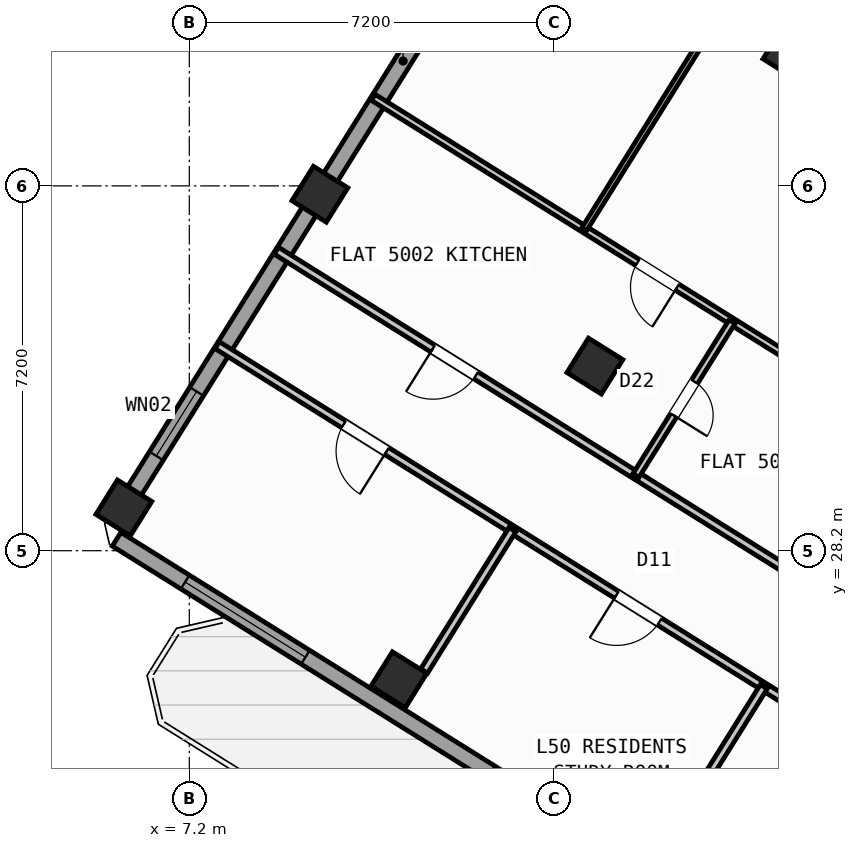
"""IFC4 building model, lengths in metres.
Left out: names, types, materials, properties, quantities, classifications, styles, units other than length and angle.
Written with IfcOpenShell. Run it as: python <this file> out.ifc"""

import sys

from ifc_helpers import new_model, si_unit, direction, frame, frame_2d, origin, origin_2d, place, context, subcontext, project, spatial, rectangle, hollow_rectangle, extrude, source, transform, mapped, element, fill, save


model = new_model("IFC4")
c1 = context("Model", 3, precision=1e-05, world=origin(), true_north=direction((0.0, 1.0)))
c2 = subcontext(c1, "Body", "Model", "MODEL_VIEW")
j1 = project(units=[si_unit("LENGTHUNIT", "METRE"), si_unit("PLANEANGLEUNIT", "RADIAN")], contexts=[c1])
p1 = place(None, origin())
s1 = spatial("IfcSite", under=j1, at=p1, CompositionType="ELEMENT")
p2 = place(p1, origin())
s2 = spatial("IfcBuilding", under=s1, at=p2, CompositionType="ELEMENT")
p3 = place(p2, frame((0.0, 0.0, 199.5)))
s3 = spatial("IfcBuildingStorey", under=s2, at=p3, CompositionType="ELEMENT", Elevation=199.5)
m1 = source(origin(), c2, "Body", "SweptSolid", [
    extrude(hollow_rectangle(XDim=0.8, YDim=0.8, WallThickness=0.032, at=origin_2d()), origin(), (0.0, 0.0, 1.0), 4.5),
])
for number, where, z_axis, x_axis in (
    (1, (19.073, 38.034, 0.0), (0.0, 0.0, 1.0), (-0.848, 0.53, 0.0)),
    (2, (15.205, 31.844, 0.0), (0.0, 0.0, 1.0), (-0.848, 0.53, 0.0)),
    (3, (11.336, 25.653, 0.0), (0.0, 0.0, 1.0), (-0.848, 0.53, 0.0)),
    (4, (9.777, 35.235, 0.0), (0.0, 0.0, 1.0), (-0.848, 0.53, 0.0)),
    (5, (5.909, 29.044, 0.0), (0.0, 0.0, 1.0), (-0.848, 0.53, 0.0)),
):
    element("IfcColumn", number, at=place(p3, frame(where, z_axis=z_axis, x_axis=x_axis)), inside=s3, PredefinedType="COLUMN", context=c2, shape_type="MappedRepresentation", body=[
        mapped(m1, transform((0.0, 0.0, 0.0), scale=1.0)),
    ])
p4 = place(p3, frame((31.76, 12.183, 0.0), z_axis=(0.0, 0.0, 1.0), x_axis=(-0.848047074256, 0.529920899612, 0.0)))
e6 = element("IfcWall", 6, at=p4, inside=s3, PredefinedType="STANDARD", context=c2, shape_type="SweptSolid", body=[
    extrude(rectangle(XDim=30.652, YDim=0.32, at=frame_2d((15.326, 0.0))), origin(), (0.0, 0.0, 1.0), 4.25),
])
p5 = place(p4, frame((15.166, 0.0, 0.0)))
e7 = element("IfcOpeningElement", 7, at=p5, cuts=e6, PredefinedType="OPENING", context=c2, shape_type="SweptSolid", body=[
    extrude(rectangle(XDim=1.2, YDim=2.15, at=frame_2d((0.6, 1.075))), frame((0.0, 0.17, 0.0), z_axis=(0.0, -1.0, 0.0), x_axis=(1.0, 0.0, 0.0)), (0.0, 0.0, 1.0), 0.34),
])
p6 = place(p4, frame((1.665, 0.0, 0.65)))
e8 = element("IfcOpeningElement", 8, at=p6, cuts=e6, PredefinedType="OPENING", context=c2, shape_type="SweptSolid", body=[
    extrude(rectangle(XDim=2.8, YDim=2.1, at=frame_2d((1.4, 1.05))), frame((0.0, 0.17, 0.0), z_axis=(0.0, -1.0, 0.0), x_axis=(1.0, 0.0, 0.0)), (0.0, 0.0, 1.0), 0.34),
])
p7 = place(p4, frame((6.894, 0.0, 0.65)))
e9 = element("IfcOpeningElement", 9, at=p7, cuts=e6, PredefinedType="OPENING", context=c2, shape_type="SweptSolid", body=[
    extrude(rectangle(XDim=2.8, YDim=2.1, at=frame_2d((1.4, 1.05))), frame((0.0, 0.17, 0.0), z_axis=(0.0, -1.0, 0.0), x_axis=(1.0, 0.0, 0.0)), (0.0, 0.0, 1.0), 0.34),
])
p8 = place(p4, frame((20.453, 0.0, 0.85)))
e10 = element("IfcOpeningElement", 10, at=p8, cuts=e6, PredefinedType="OPENING", context=c2, shape_type="SweptSolid", body=[
    extrude(rectangle(XDim=1.5, YDim=1.5, at=frame_2d((0.75, 0.75))), frame((0.0, 0.17, 0.0), z_axis=(0.0, -1.0, 0.0), x_axis=(1.0, 0.0, 0.0)), (0.0, 0.0, 1.0), 0.34),
])
p9 = place(p4, frame((26.258, 0.0, 0.65)))
e11 = element("IfcOpeningElement", 11, at=p9, cuts=e6, PredefinedType="OPENING", context=c2, shape_type="SweptSolid", body=[
    extrude(rectangle(XDim=2.8, YDim=2.1, at=frame_2d((1.4, 1.05))), frame((0.0, 0.17, 0.0), z_axis=(0.0, -1.0, 0.0), x_axis=(1.0, 0.0, 0.0)), (0.0, 0.0, 1.0), 0.34),
])
p10 = place(p3, frame((5.7, 28.71, 0.0), z_axis=(0.0, 0.0, 1.0), x_axis=(0.529923711467, 0.8480453172, 0.0)))
e12 = element("IfcWall", 12, at=p10, inside=s3, PredefinedType="STANDARD", context=c2, shape_type="SweptSolid", body=[
    extrude(rectangle(XDim=21.587, YDim=0.32, at=frame_2d((10.794, 0.0))), origin(), (0.0, 0.0, 1.0), 3.725),
])
p11 = place(p10, frame((1.604, 0.0, 0.85)))
e13 = element("IfcOpeningElement", 13, at=p11, cuts=e12, PredefinedType="OPENING", context=c2, shape_type="SweptSolid", body=[
    extrude(rectangle(XDim=1.5, YDim=1.5, at=frame_2d((0.75, 0.75))), frame((0.0, 0.17, 0.0), z_axis=(0.0, -1.0, 0.0), x_axis=(1.0, 0.0, 0.0)), (0.0, 0.0, 1.0), 0.34),
])
p12 = place(p10, frame((11.269, 0.0, 0.8)))
e14 = element("IfcOpeningElement", 14, at=p12, cuts=e12, PredefinedType="OPENING", context=c2, shape_type="SweptSolid", body=[
    extrude(rectangle(XDim=2.1, YDim=1.55, at=frame_2d((1.05, 0.775))), frame((0.0, 0.17, 0.0), z_axis=(0.0, -1.0, 0.0), x_axis=(1.0, 0.0, 0.0)), (0.0, 0.0, 1.0), 0.34),
])
p13 = place(p10, frame((17.406, 0.0, 0.85)))
e15 = element("IfcOpeningElement", 15, at=p13, cuts=e12, PredefinedType="OPENING", context=c2, shape_type="SweptSolid", body=[
    extrude(rectangle(XDim=1.5, YDim=1.5, at=frame_2d((0.75, 0.75))), frame((0.0, 0.17, 0.0), z_axis=(0.0, -1.0, 0.0), x_axis=(1.0, 0.0, 0.0)), (0.0, 0.0, 1.0), 0.34),
])
p14 = place(p3, frame((17.424, 47.083, 0.0), z_axis=(0.0, 0.0, 1.0), x_axis=(0.848049927979, -0.529916332693, 0.0)))
e16 = element("IfcWall", 16, at=p14, inside=s3, PredefinedType="STANDARD", context=c2, shape_type="SweptSolid", body=[
    extrude(rectangle(XDim=29.223, YDim=0.32, at=frame_2d((14.612, 0.0))), origin(), (0.0, 0.0, 1.0), 4.25),
])
p15 = place(p14, frame((2.949, 0.0, 0.0)))
e17 = element("IfcOpeningElement", 17, at=p15, cuts=e16, PredefinedType="OPENING", context=c2, shape_type="SweptSolid", body=[
    extrude(rectangle(XDim=1.05, YDim=2.15, at=frame_2d((0.525, 1.075))), frame((0.0, 0.17, 0.0), z_axis=(0.0, -1.0, 0.0), x_axis=(1.0, 0.0, 0.0)), (0.0, 0.0, 1.0), 0.34),
])
p16 = place(p14, frame((0.789, 0.0, 0.85)))
e18 = element("IfcOpeningElement", 18, at=p16, cuts=e16, PredefinedType="OPENING", context=c2, shape_type="SweptSolid", body=[
    extrude(rectangle(XDim=1.5, YDim=1.5, at=frame_2d((0.75, 0.75))), frame((0.0, 0.17, 0.0), z_axis=(0.0, -1.0, 0.0), x_axis=(1.0, 0.0, 0.0)), (0.0, 0.0, 1.0), 0.34),
])
p17 = place(p14, frame((8.329, 0.0, 0.8)))
e19 = element("IfcOpeningElement", 19, at=p17, cuts=e16, PredefinedType="OPENING", context=c2, shape_type="SweptSolid", body=[
    extrude(rectangle(XDim=2.1, YDim=1.55, at=frame_2d((1.05, 0.775))), frame((0.0, 0.17, 0.0), z_axis=(0.0, -1.0, 0.0), x_axis=(1.0, 0.0, 0.0)), (0.0, 0.0, 1.0), 0.34),
])
p18 = place(p14, frame((13.739, 0.0, 0.85)))
e20 = element("IfcOpeningElement", 20, at=p18, cuts=e16, PredefinedType="OPENING", context=c2, shape_type="SweptSolid", body=[
    extrude(rectangle(XDim=1.5, YDim=1.5, at=frame_2d((0.75, 0.75))), frame((0.0, 0.17, 0.0), z_axis=(0.0, -1.0, 0.0), x_axis=(1.0, 0.0, 0.0)), (0.0, 0.0, 1.0), 0.34),
])
p19 = place(p14, frame((21.114, 0.0, 0.65)))
e21 = element("IfcOpeningElement", 21, at=p19, cuts=e16, PredefinedType="OPENING", context=c2, shape_type="SweptSolid", body=[
    extrude(rectangle(XDim=2.8, YDim=2.1, at=frame_2d((1.4, 1.05))), frame((0.0, 0.17, 0.0), z_axis=(0.0, -1.0, 0.0), x_axis=(1.0, 0.0, 0.0)), (0.0, 0.0, 1.0), 0.34),
])
p20 = place(p14, frame((26.784, 0.0, 0.85)))
e22 = element("IfcOpeningElement", 22, at=p20, cuts=e16, PredefinedType="OPENING", context=c2, shape_type="SweptSolid", body=[
    extrude(rectangle(XDim=1.5, YDim=1.5, at=frame_2d((0.75, 0.75))), frame((0.0, 0.17, 0.0), z_axis=(0.0, -1.0, 0.0), x_axis=(1.0, 0.0, 0.0)), (0.0, 0.0, 1.0), 0.34),
])
p21 = place(p3, frame((23.104, 25.256, 0.0), z_axis=(0.0, 0.0, 1.0), x_axis=(-0.848041752158, 0.529929416617, 0.0)))
e23 = element("IfcWall", 23, at=p21, inside=s3, PredefinedType="PARTITIONING", context=c2, shape_type="SweptSolid", body=[
    extrude(rectangle(XDim=16.73, YDim=0.16, at=frame_2d((8.365, 0.0))), origin(), (0.0, 0.0, 1.0), 4.24),
])
p22 = place(p21, frame((2.22, 0.0, 0.0)))
e24 = element("IfcOpeningElement", 24, at=p22, cuts=e23, PredefinedType="OPENING", context=c2, shape_type="SweptSolid", body=[
    extrude(rectangle(XDim=0.86, YDim=2.05, at=frame_2d((0.43, 1.025))), frame((0.0, 0.09, 0.0), z_axis=(0.0, -1.0, 0.0), x_axis=(1.0, 0.0, 0.0)), (0.0, 0.0, 1.0), 0.18),
])
p23 = place(p21, frame((12.084, 0.0, 0.0)))
e25 = element("IfcOpeningElement", 25, at=p23, cuts=e23, PredefinedType="OPENING", context=c2, shape_type="SweptSolid", body=[
    extrude(rectangle(XDim=1.0, YDim=2.1, at=frame_2d((0.5, 1.05))), frame((0.0, 0.09, 0.0), z_axis=(0.0, -1.0, 0.0), x_axis=(1.0, 0.0, 0.0)), (0.0, 0.0, 1.0), 0.18),
])
p24 = place(p3, frame((21.938, 23.391, 0.0), z_axis=(0.0, 0.0, 1.0), x_axis=(-0.848045850158, 0.529922858565, 0.0)))
e26 = element("IfcWall", 26, at=p24, inside=s3, PredefinedType="PARTITIONING", context=c2, shape_type="SweptSolid", body=[
    extrude(rectangle(XDim=16.73, YDim=0.16, at=frame_2d((8.365, 0.0))), origin(), (0.0, 0.0, 1.0), 4.24),
])
p25 = place(p24, frame((1.505, 0.0, 0.0)))
e27 = element("IfcOpeningElement", 27, at=p25, cuts=e26, PredefinedType="OPENING", context=c2, shape_type="SweptSolid", body=[
    extrude(rectangle(XDim=1.0, YDim=2.1, at=frame_2d((0.5, 1.05))), frame((0.0, 0.09, 0.0), z_axis=(0.0, -1.0, 0.0), x_axis=(1.0, 0.0, 0.0)), (0.0, 0.0, 1.0), 0.18),
])
p26 = place(p24, frame((6.435, 0.0, 0.0)))
e28 = element("IfcOpeningElement", 28, at=p26, cuts=e26, PredefinedType="OPENING", context=c2, shape_type="SweptSolid", body=[
    extrude(rectangle(XDim=1.0, YDim=2.1, at=frame_2d((0.5, 1.05))), frame((0.0, 0.09, 0.0), z_axis=(0.0, -1.0, 0.0), x_axis=(1.0, 0.0, 0.0)), (0.0, 0.0, 1.0), 0.18),
])
p27 = place(p24, frame((12.784, 0.0, 0.0)))
e29 = element("IfcOpeningElement", 29, at=p27, cuts=e26, PredefinedType="OPENING", context=c2, shape_type="SweptSolid", body=[
    extrude(rectangle(XDim=1.0, YDim=2.1, at=frame_2d((0.5, 1.05))), frame((0.0, 0.09, 0.0), z_axis=(0.0, -1.0, 0.0), x_axis=(1.0, 0.0, 0.0)), (0.0, 0.0, 1.0), 0.18),
])
p28 = place(p3, frame((18.538, 25.516, 0.0), z_axis=(0.0, 0.0, 1.0), x_axis=(-0.529938869374, -0.84803584519, 0.0)))
e30 = element("IfcWall", 30, at=p28, inside=s3, PredefinedType="PARTITIONING", context=c2, shape_type="SweptSolid", body=[
    extrude(rectangle(XDim=3.288, YDim=0.16, at=frame_2d((1.644, 0.0))), origin(), (0.0, 0.0, 1.0), 3.725),
])
p29 = place(p3, frame((13.577, 28.615, 0.0), z_axis=(0.0, 0.0, 1.0), x_axis=(-0.529885466561, -0.848069214349, 0.0)))
e31 = element("IfcWall", 31, at=p29, inside=s3, PredefinedType="PARTITIONING", context=c2, shape_type="SweptSolid", body=[
    extrude(rectangle(XDim=3.288, YDim=0.16, at=frame_2d((1.644, 0.0))), origin(), (0.0, 0.0, 1.0), 4.24),
])
p30 = place(p3, frame((21.787, 30.301, 0.0), z_axis=(0.0, 0.0, 1.0), x_axis=(-0.848043949058, 0.52992590092, 0.0)))
e32 = element("IfcWall", 32, at=p30, inside=s3, PredefinedType="PLUMBINGWALL", context=c2, shape_type="SweptSolid", body=[
    extrude(rectangle(XDim=12.92, YDim=0.14, at=frame_2d((6.46, 0.0))), origin(), (0.0, 0.0, 1.0), 4.24),
])
p31 = place(p30, frame((5.849, 0.0, 0.0)))
e33 = element("IfcOpeningElement", 33, at=p31, cuts=e32, PredefinedType="OPENING", context=c2, shape_type="SweptSolid", body=[
    extrude(rectangle(XDim=0.92, YDim=2.08, at=frame_2d((0.46, 1.04))), frame((0.0, 0.08, 0.0), z_axis=(0.0, -1.0, 0.0), x_axis=(1.0, 0.0, 0.0)), (0.0, 0.0, 1.0), 0.16),
])
p32 = place(p3, frame((17.913, 32.721, 0.0), z_axis=(0.0, 0.0, 1.0), x_axis=(-0.529906983049, -0.848055770169, 0.0)))
e34 = element("IfcWall", 34, at=p32, inside=s3, PredefinedType="PLUMBINGWALL", context=c2, shape_type="SweptSolid", body=[
    extrude(rectangle(XDim=3.58, YDim=0.14, at=frame_2d((1.79, 0.0))), origin(), (0.0, 0.0, 1.0), 4.24),
])
p33 = place(p32, frame((1.4, 0.0, 0.0)))
e35 = element("IfcOpeningElement", 35, at=p33, cuts=e34, PredefinedType="OPENING", context=c2, shape_type="SweptSolid", body=[
    extrude(rectangle(XDim=0.78, YDim=2.05, at=frame_2d((0.39, 1.025))), frame((0.0, 0.08, 0.0), z_axis=(0.0, -1.0, 0.0), x_axis=(1.0, 0.0, 0.0)), (0.0, 0.0, 1.0), 0.16),
])
p34 = place(p3, frame((21.375, 44.756, 0.0), z_axis=(0.0, 0.0, 1.0), x_axis=(-0.529905980331, -0.848056396715, 0.0)))
e36 = element("IfcWall", 36, at=p34, inside=s3, PredefinedType="PARTITIONING", context=c2, shape_type="SweptSolid", body=[
    extrude(rectangle(XDim=12.04, YDim=0.11, at=frame_2d((6.02, 0.0))), origin(), (0.0, 0.0, 1.0), 4.24),
])
p35 = place(p34, frame((0.47, 0.0, 0.0)))
e37 = element("IfcOpeningElement", 37, at=p35, cuts=e36, PredefinedType="OPENING", context=c2, shape_type="SweptSolid", body=[
    extrude(rectangle(XDim=0.92, YDim=2.08, at=frame_2d((0.46, 1.04))), frame((0.0, 0.065, 0.0), z_axis=(0.0, -1.0, 0.0), x_axis=(1.0, 0.0, 0.0)), (0.0, 0.0, 1.0), 0.13),
])
m2 = source(origin(), c2, "Body", "SweptSolid", [
    extrude(rectangle(XDim=2.8, YDim=2.1, at=frame_2d((1.4, 1.05))), frame((0.0, 0.03, 0.0), z_axis=(0.0, -1.0, 0.0), x_axis=(1.0, 0.0, 0.0)), (0.0, 0.0, 1.0), 0.06),
])
p36 = place(p9, origin())
e38 = element("IfcWindow", 38, at=p36, inside=s3, PartitioningType="SINGLE_PANEL", PredefinedType="WINDOW", context=c2, shape_type="MappedRepresentation", body=[
    mapped(m2, transform((0.0, 0.0, 0.0), scale=1.0)),
])
fill(e11, e38)
m3 = source(origin(), c2, "Body", "SweptSolid", [
    extrude(rectangle(XDim=1.5, YDim=1.5, at=frame_2d((0.75, 0.75))), frame((0.0, 0.03, 0.0), z_axis=(0.0, -1.0, 0.0), x_axis=(1.0, 0.0, 0.0)), (0.0, 0.0, 1.0), 0.06),
])
p37 = place(p11, origin())
e39 = element("IfcWindow", 39, at=p37, inside=s3, PartitioningType="SINGLE_PANEL", PredefinedType="WINDOW", context=c2, shape_type="MappedRepresentation", body=[
    mapped(m3, transform((0.0, 0.0, 0.0), scale=1.0)),
])
fill(e13, e39)
m4 = source(origin(), c2, "Body", "SweptSolid", [
    extrude(rectangle(XDim=1.0, YDim=2.1, at=frame_2d((0.5, 1.05))), frame((0.0, 0.025, 0.0), z_axis=(0.0, -1.0, 0.0), x_axis=(1.0, 0.0, 0.0)), (0.0, 0.0, 1.0), 0.05),
])
p38 = place(p26, origin())
e40 = element("IfcDoor", 40, at=p38, inside=s3, OperationType="SINGLE_SWING_RIGHT", PredefinedType="DOOR", context=c2, shape_type="MappedRepresentation", body=[
    mapped(m4, transform((0.0, 0.0, 0.0), scale=1.0)),
])
fill(e28, e40)
p39 = place(p27, origin())
e41 = element("IfcDoor", 41, at=p39, inside=s3, OperationType="SINGLE_SWING_LEFT", PredefinedType="DOOR", context=c2, shape_type="MappedRepresentation", body=[
    mapped(m4, transform((0.0, 0.0, 0.0), scale=1.0)),
])
fill(e29, e41)
p40 = place(p23, origin())
e42 = element("IfcDoor", 42, at=p40, inside=s3, OperationType="SINGLE_SWING_RIGHT", PredefinedType="DOOR", context=c2, shape_type="MappedRepresentation", body=[
    mapped(m4, transform((0.0, 0.0, 0.0), scale=1.0)),
])
fill(e25, e42)
m5 = source(origin(), c2, "Body", "SweptSolid", [
    extrude(rectangle(XDim=0.92, YDim=2.08, at=frame_2d((0.46, 1.04))), frame((0.0, 0.025, 0.0), z_axis=(0.0, -1.0, 0.0), x_axis=(1.0, 0.0, 0.0)), (0.0, 0.0, 1.0), 0.05),
])
p41 = place(p31, origin())
e43 = element("IfcDoor", 43, at=p41, inside=s3, OperationType="SINGLE_SWING_LEFT", PredefinedType="DOOR", context=c2, shape_type="MappedRepresentation", body=[
    mapped(m5, transform((0.0, 0.0, 0.0), scale=1.0)),
])
fill(e33, e43)
m6 = source(origin(), c2, "Body", "SweptSolid", [
    extrude(rectangle(XDim=0.78, YDim=2.05, at=frame_2d((0.39, 1.025))), frame((0.0, 0.025, 0.0), z_axis=(0.0, -1.0, 0.0), x_axis=(1.0, 0.0, 0.0)), (0.0, 0.0, 1.0), 0.05),
])
p42 = place(p33, origin())
e44 = element("IfcDoor", 44, at=p42, inside=s3, OperationType="SINGLE_SWING_RIGHT", PredefinedType="DOOR", context=c2, shape_type="MappedRepresentation", body=[
    mapped(m6, transform((0.0, 0.0, 0.0), scale=1.0)),
])
fill(e35, e44)
save(model, sys.argv[1])
